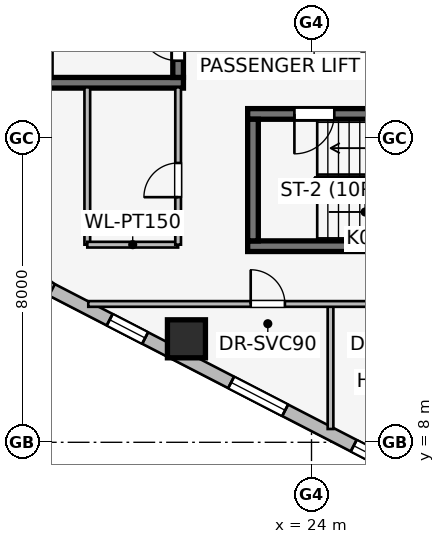
"""IFC4 building model, lengths in metres.
Left out: names, types, materials, properties, quantities, classifications, styles, units other than length and angle.
Written with IfcOpenShell. Run it as: python <this file> out.ifc"""

import sys

from ifc_helpers import new_model, si_unit, direction, frame, frame_2d, origin, origin_2d, place, context, subcontext, project, spatial, rectangle, extrude, element, fill, save


model = new_model("IFC4")
c1 = context("Model", 3, precision=1e-05, world=origin(), true_north=direction((0.0, 1.0)))
c2 = subcontext(c1, "Body", "Model", "MODEL_VIEW")
j1 = project(units=[si_unit("LENGTHUNIT", "METRE"), si_unit("PLANEANGLEUNIT", "RADIAN")], contexts=[c1])
p1 = place(None, origin())
s1 = spatial("IfcSite", under=j1, at=p1, CompositionType="ELEMENT")
p2 = place(p1, origin())
s2 = spatial("IfcBuilding", under=s1, at=p2, CompositionType="ELEMENT")
p3 = place(p2, frame((0.0, 0.0, 149.85)))
s3 = spatial("IfcBuildingStorey", under=s2, at=p3, CompositionType="ELEMENT", Elevation=149.85)
p4 = place(p3, frame((16.87, 17.46, 0.0), z_axis=(0.0, 0.0, 1.0), x_axis=(1.0, 0.0, 0.0)))
e1 = element("IfcWall", 1, at=p4, inside=s3, PredefinedType="SHEAR", context=c2, shape_type="SweptSolid", body=[
    extrude(rectangle(XDim=3.76, YDim=0.28, at=frame_2d((1.88, 0.0))), origin(), (0.0, 0.0, 1.0), 3.45),
])
p5 = place(p3, frame((20.49, 17.6, 0.0), z_axis=(0.0, 0.0, 1.0), x_axis=(0.0, 1.0, 0.0)))
e2 = element("IfcWall", 2, at=p5, inside=s3, PredefinedType="SHEAR", context=c2, shape_type="SweptSolid", body=[
    extrude(rectangle(XDim=7.8, YDim=0.28, at=frame_2d((3.9, 0.0))), origin(), (0.0, 0.0, 1.0), 3.45),
])
p6 = place(p5, frame((0.44, 0.0, 0.0)))
e3 = element("IfcOpeningElement", 3, at=p6, cuts=e2, PredefinedType="OPENING", context=c2, shape_type="SweptSolid", body=[
    extrude(rectangle(XDim=1.05, YDim=2.0, at=frame_2d((0.525, 1.0))), frame((0.0, 0.15, 0.0), z_axis=(0.0, -1.0, 0.0), x_axis=(1.0, 0.0, 0.0)), (0.0, 0.0, 1.0), 0.3),
])
p7 = place(p3, frame((22.32, 13.16, 0.0), z_axis=(0.0, 0.0, 1.0), x_axis=(1.0, 0.0, 0.0)))
e4 = element("IfcWall", 4, at=p7, inside=s3, PredefinedType="SHEAR", context=c2, shape_type="SweptSolid", body=[
    extrude(rectangle(XDim=8.36, YDim=0.28, at=frame_2d((4.18, 0.0))), origin(), (0.0, 0.0, 1.0), 3.45),
])
p8 = place(p3, frame((30.68, 16.64, 0.0), z_axis=(0.0, 0.0, 1.0), x_axis=(-1.0, 0.0, 0.0)))
e5 = element("IfcWall", 5, at=p8, inside=s3, PredefinedType="SHEAR", context=c2, shape_type="SweptSolid", body=[
    extrude(rectangle(XDim=8.36, YDim=0.28, at=frame_2d((4.18, 0.0))), origin(), (0.0, 0.0, 1.0), 3.45),
])
p9 = place(p8, frame((6.08, 0.0, 0.0)))
e6 = element("IfcOpeningElement", 6, at=p9, cuts=e5, PredefinedType="OPENING", context=c2, shape_type="SweptSolid", body=[
    extrude(rectangle(XDim=1.05, YDim=2.0, at=frame_2d((0.525, 1.0))), frame((0.0, 0.15, 0.0), z_axis=(0.0, -1.0, 0.0), x_axis=(1.0, 0.0, 0.0)), (0.0, 0.0, 1.0), 0.3),
])
p10 = place(p3, frame((22.46, 16.5, 0.0), z_axis=(0.0, 0.0, 1.0), x_axis=(0.0, -1.0, 0.0)))
e7 = element("IfcWall", 7, at=p10, inside=s3, PredefinedType="SHEAR", context=c2, shape_type="SweptSolid", body=[
    extrude(rectangle(XDim=3.2, YDim=0.28, at=frame_2d((1.6, 0.0))), origin(), (0.0, 0.0, 1.0), 3.45),
])
p11 = place(p3, frame((20.709, 10.723, 0.0), z_axis=(0.0, 0.0, 1.0), x_axis=(1.0, 0.0, 0.0)))
e8 = element("IfcColumn", 8, at=p11, inside=s3, PredefinedType="COLUMN", context=c2, shape_type="SweptSolid", body=[
    extrude(rectangle(XDim=1.0, YDim=1.0, at=origin_2d()), origin(), (0.0, 0.0, 1.0), 3.45),
])
p12 = place(p3, frame((17.243, 11.95, 0.0), z_axis=(0.0, 0.0, 1.0), x_axis=(-0.790621329885, 0.612305408053, 0.0)))
e9 = element("IfcWall", 9, at=p12, inside=s3, PredefinedType="STANDARD", context=c2, shape_type="SweptSolid", body=[
    extrude(rectangle(XDim=1.676, YDim=0.33, at=frame_2d((0.838, 0.0))), origin(), (0.0, 0.0, 1.0), 3.19),
])
p13 = place(p3, frame((33.769, 3.442, 0.0), z_axis=(0.0, 0.0, 1.0), x_axis=(-0.888613612362, 0.458656568606, 0.0)))
e10 = element("IfcWall", 10, at=p13, inside=s3, PredefinedType="STANDARD", context=c2, shape_type="SweptSolid", body=[
    extrude(rectangle(XDim=18.681, YDim=0.34, at=frame_2d((9.34, 0.0))), origin(), (0.0, 0.0, 1.0), 3.19),
])
p14 = place(p13, frame((1.75, 0.0, 0.75)))
e11 = element("IfcOpeningElement", 11, at=p14, cuts=e10, PredefinedType="OPENING", context=c2, shape_type="SweptSolid", body=[
    extrude(rectangle(XDim=1.05, YDim=1.4, at=frame_2d((0.525, 0.7))), frame((0.0, 0.18, 0.0), z_axis=(0.0, -1.0, 0.0), x_axis=(1.0, 0.0, 0.0)), (0.0, 0.0, 1.0), 0.36),
])
p15 = place(p13, frame((4.765, 0.0, 0.75)))
e12 = element("IfcOpeningElement", 12, at=p15, cuts=e10, PredefinedType="OPENING", context=c2, shape_type="SweptSolid", body=[
    extrude(rectangle(XDim=2.1, YDim=1.5, at=frame_2d((1.05, 0.75))), frame((0.0, 0.18, 0.0), z_axis=(0.0, -1.0, 0.0), x_axis=(1.0, 0.0, 0.0)), (0.0, 0.0, 1.0), 0.36),
])
p16 = place(p13, frame((7.644, 0.0, 0.75)))
e13 = element("IfcOpeningElement", 13, at=p16, cuts=e10, PredefinedType="OPENING", context=c2, shape_type="SweptSolid", body=[
    extrude(rectangle(XDim=2.1, YDim=1.5, at=frame_2d((1.05, 0.75))), frame((0.0, 0.18, 0.0), z_axis=(0.0, -1.0, 0.0), x_axis=(1.0, 0.0, 0.0)), (0.0, 0.0, 1.0), 0.36),
])
p17 = place(p13, frame((11.774, 0.0, 0.75)))
e14 = element("IfcOpeningElement", 14, at=p17, cuts=e10, PredefinedType="OPENING", context=c2, shape_type="SweptSolid", body=[
    extrude(rectangle(XDim=1.6, YDim=1.55, at=frame_2d((0.8, 0.775))), frame((0.0, 0.18, 0.0), z_axis=(0.0, -1.0, 0.0), x_axis=(1.0, 0.0, 0.0)), (0.0, 0.0, 1.0), 0.36),
])
p18 = place(p13, frame((15.92, 0.0, 0.75)))
e15 = element("IfcOpeningElement", 15, at=p18, cuts=e10, PredefinedType="OPENING", context=c2, shape_type="SweptSolid", body=[
    extrude(rectangle(XDim=1.05, YDim=1.4, at=frame_2d((0.525, 0.7))), frame((0.0, 0.18, 0.0), z_axis=(0.0, -1.0, 0.0), x_axis=(1.0, 0.0, 0.0)), (0.0, 0.0, 1.0), 0.36),
])
p19 = place(p3, frame((18.1, 17.34, 0.0), z_axis=(0.0, 0.0, 1.0), x_axis=(0.0, -1.0, 0.0)))
e16 = element("IfcWall", 16, at=p19, inside=s3, PredefinedType="PARTITIONING", context=c2, shape_type="SweptSolid", body=[
    extrude(rectangle(XDim=4.14, YDim=0.15, at=frame_2d((2.07, 0.0))), origin(), (0.0, 0.0, 1.0), 3.19),
])
p20 = place(p3, frame((18.1, 13.2, 0.0), z_axis=(0.0, 0.0, 1.0), x_axis=(1.0, 0.0, 0.0)))
e17 = element("IfcWall", 17, at=p20, inside=s3, PredefinedType="PARTITIONING", context=c2, shape_type="SweptSolid", body=[
    extrude(rectangle(XDim=2.39, YDim=0.15, at=frame_2d((1.195, 0.0))), origin(), (0.0, 0.0, 1.0), 3.19),
])
p21 = place(p3, frame((20.49, 13.2, 0.0), z_axis=(0.0, 0.0, 1.0), x_axis=(0.0, 1.0, 0.0)))
e18 = element("IfcWall", 18, at=p21, inside=s3, PredefinedType="PARTITIONING", context=c2, shape_type="SweptSolid", body=[
    extrude(rectangle(XDim=4.14, YDim=0.15, at=frame_2d((2.07, 0.0))), origin(), (0.0, 0.0, 1.0), 3.19),
])
p22 = place(p21, frame((1.25, 0.0, 0.0)))
e19 = element("IfcOpeningElement", 19, at=p22, cuts=e18, PredefinedType="OPENING", context=c2, shape_type="SweptSolid", body=[
    extrude(rectangle(XDim=0.9, YDim=2.0, at=frame_2d((0.45, 1.0))), frame((0.0, 0.085, 0.0), z_axis=(0.0, -1.0, 0.0), x_axis=(1.0, 0.0, 0.0)), (0.0, 0.0, 1.0), 0.17),
])
p23 = place(p3, frame((24.5, 8.35, 0.0), z_axis=(0.0, 0.0, 1.0), x_axis=(0.0, 1.0, 0.0)))
e20 = element("IfcWall", 20, at=p23, inside=s3, PredefinedType="PARTITIONING", context=c2, shape_type="SweptSolid", body=[
    extrude(rectangle(XDim=3.29, YDim=0.15, at=frame_2d((1.645, 0.0))), origin(), (0.0, 0.0, 1.0), 3.19),
])
p24 = place(p3, frame((18.126, 11.64, 0.0), z_axis=(0.0, 0.0, 1.0), x_axis=(1.0, 0.0, 0.0)))
e21 = element("IfcWall", 21, at=p24, inside=s3, PredefinedType="PARTITIONING", context=c2, shape_type="SweptSolid", body=[
    extrude(rectangle(XDim=14.724, YDim=0.15, at=frame_2d((7.362, 0.0))), origin(), (0.0, 0.0, 1.0), 3.19),
])
p25 = place(p24, frame((4.274, 0.0, 0.0)))
e22 = element("IfcOpeningElement", 22, at=p25, cuts=e21, PredefinedType="OPENING", context=c2, shape_type="SweptSolid", body=[
    extrude(rectangle(XDim=0.9, YDim=2.0, at=frame_2d((0.45, 1.0))), frame((0.0, 0.085, 0.0), z_axis=(0.0, -1.0, 0.0), x_axis=(1.0, 0.0, 0.0)), (0.0, 0.0, 1.0), 0.17),
])
p26 = place(p24, frame((7.724, 0.0, 0.0)))
e23 = element("IfcOpeningElement", 23, at=p26, cuts=e21, PredefinedType="OPENING", context=c2, shape_type="SweptSolid", body=[
    extrude(rectangle(XDim=0.9, YDim=2.0, at=frame_2d((0.45, 1.0))), frame((0.0, 0.085, 0.0), z_axis=(0.0, -1.0, 0.0), x_axis=(1.0, 0.0, 0.0)), (0.0, 0.0, 1.0), 0.17),
])
p27 = place(p16, origin())
e24 = element("IfcWindow", 24, at=p27, inside=s3, PartitioningType="SINGLE_PANEL", PredefinedType="WINDOW", context=c2, shape_type="SweptSolid", body=[
    extrude(rectangle(XDim=2.1, YDim=1.5, at=frame_2d((1.05, 0.75))), frame((0.0, 0.03, 0.0), z_axis=(0.0, -1.0, 0.0), x_axis=(1.0, 0.0, 0.0)), (0.0, 0.0, 1.0), 0.06),
])
fill(e13, e24)
p28 = place(p17, origin())
e25 = element("IfcWindow", 25, at=p28, inside=s3, PartitioningType="SINGLE_PANEL", PredefinedType="WINDOW", context=c2, shape_type="SweptSolid", body=[
    extrude(rectangle(XDim=1.6, YDim=1.55, at=frame_2d((0.8, 0.775))), frame((0.0, 0.03, 0.0), z_axis=(0.0, -1.0, 0.0), x_axis=(1.0, 0.0, 0.0)), (0.0, 0.0, 1.0), 0.06),
])
fill(e14, e25)
p29 = place(p18, origin())
e26 = element("IfcWindow", 26, at=p29, inside=s3, PartitioningType="SINGLE_PANEL", PredefinedType="WINDOW", context=c2, shape_type="SweptSolid", body=[
    extrude(rectangle(XDim=1.05, YDim=1.4, at=frame_2d((0.525, 0.7))), frame((0.0, 0.03, 0.0), z_axis=(0.0, -1.0, 0.0), x_axis=(1.0, 0.0, 0.0)), (0.0, 0.0, 1.0), 0.06),
])
fill(e15, e26)
p30 = place(p6, origin())
e27 = element("IfcDoor", 27, at=p30, inside=s3, OperationType="SINGLE_SWING_RIGHT", PredefinedType="DOOR", context=c2, shape_type="SweptSolid", body=[
    extrude(rectangle(XDim=1.05, YDim=2.0, at=frame_2d((0.525, 1.0))), frame((0.0, 0.025, 0.0), z_axis=(0.0, -1.0, 0.0), x_axis=(1.0, 0.0, 0.0)), (0.0, 0.0, 1.0), 0.05),
])
fill(e3, e27)
p31 = place(p9, origin())
e28 = element("IfcDoor", 28, at=p31, inside=s3, OperationType="SINGLE_SWING_RIGHT", PredefinedType="DOOR", context=c2, shape_type="SweptSolid", body=[
    extrude(rectangle(XDim=1.05, YDim=2.0, at=frame_2d((0.525, 1.0))), frame((0.0, 0.025, 0.0), z_axis=(0.0, -1.0, 0.0), x_axis=(1.0, 0.0, 0.0)), (0.0, 0.0, 1.0), 0.05),
])
fill(e6, e28)
p32 = place(p22, origin())
e29 = element("IfcDoor", 29, at=p32, inside=s3, OperationType="SINGLE_SWING_LEFT", PredefinedType="DOOR", context=c2, shape_type="SweptSolid", body=[
    extrude(rectangle(XDim=0.9, YDim=2.0, at=frame_2d((0.45, 1.0))), frame((0.0, 0.025, 0.0), z_axis=(0.0, -1.0, 0.0), x_axis=(1.0, 0.0, 0.0)), (0.0, 0.0, 1.0), 0.05),
])
fill(e19, e29)
p33 = place(p25, origin())
e30 = element("IfcDoor", 30, at=p33, inside=s3, OperationType="SINGLE_SWING_LEFT", PredefinedType="DOOR", context=c2, shape_type="SweptSolid", body=[
    extrude(rectangle(XDim=0.9, YDim=2.0, at=frame_2d((0.45, 1.0))), frame((0.0, 0.025, 0.0), z_axis=(0.0, -1.0, 0.0), x_axis=(1.0, 0.0, 0.0)), (0.0, 0.0, 1.0), 0.05),
])
fill(e22, e30)
save(model, sys.argv[1])
